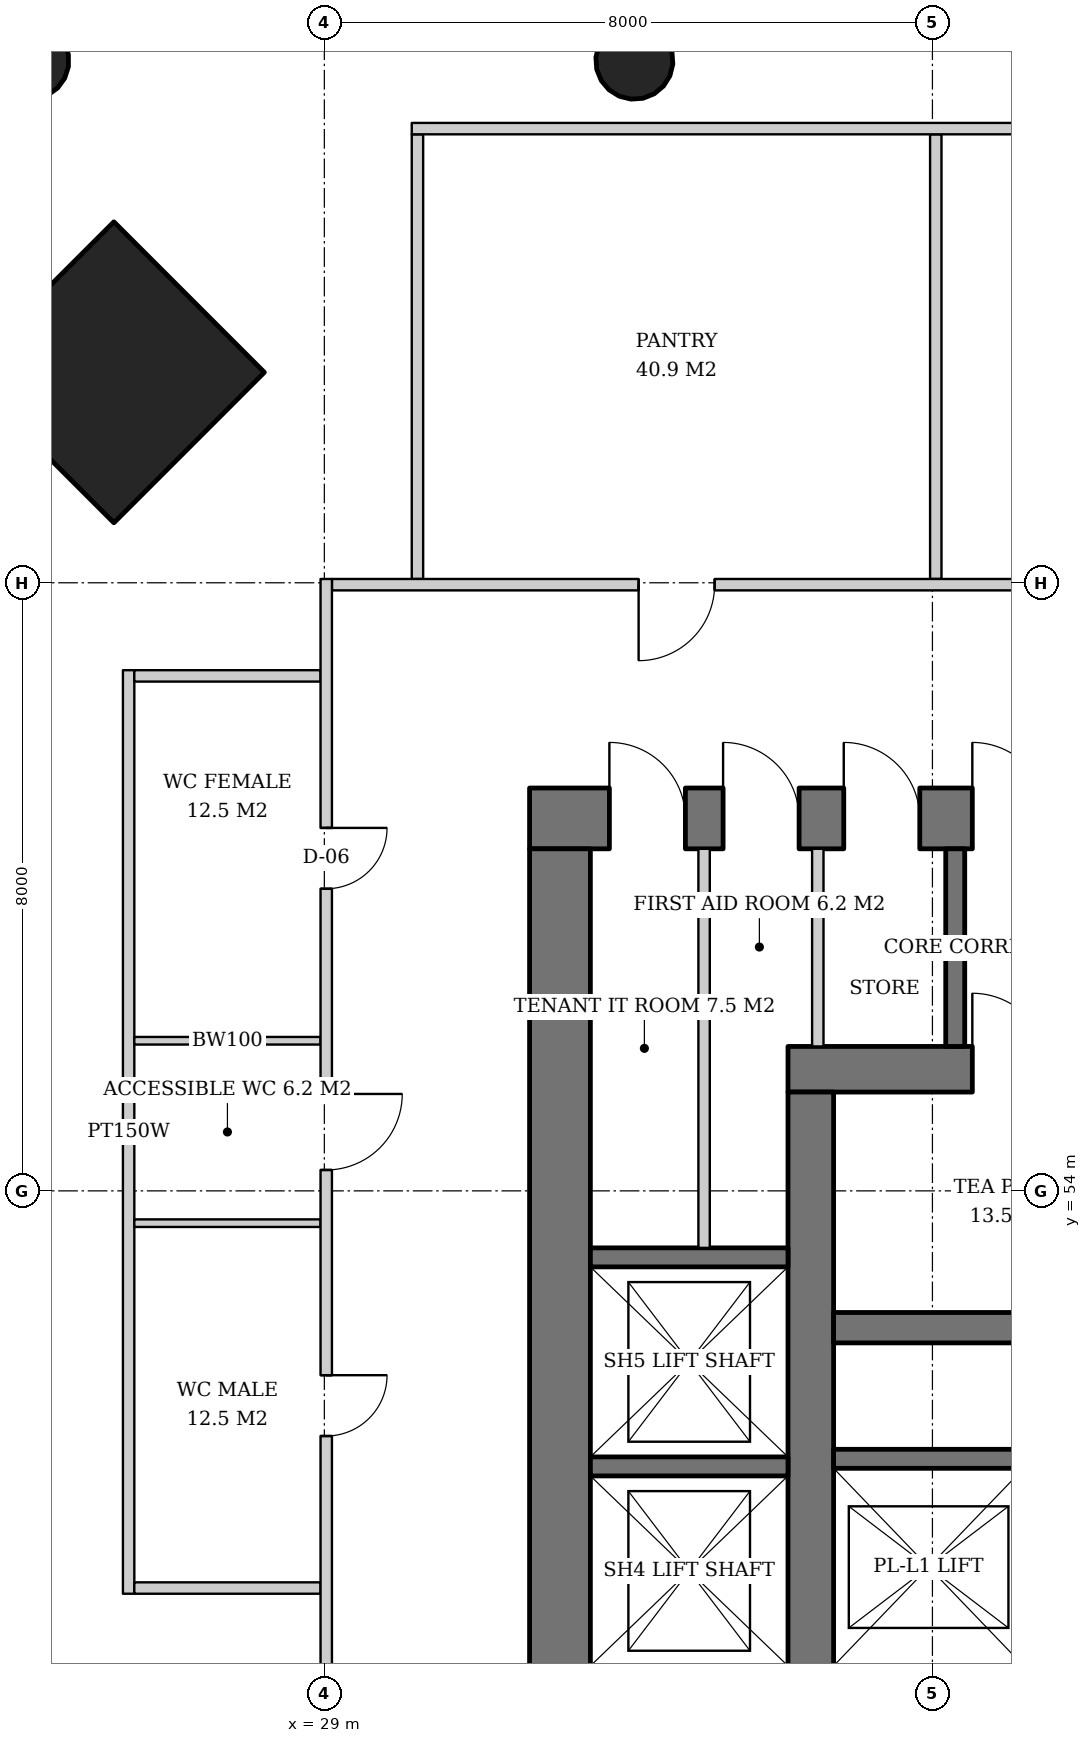
"""IFC4 building model, lengths in metres.
Left out: names, types, materials, properties, quantities, classifications, styles, units other than length and angle.
Written with IfcOpenShell. Run it as: python <this file> out.ifc"""

import sys

from ifc_helpers import new_model, si_unit, direction, frame, frame_2d, origin, origin_2d, place, context, subcontext, project, spatial, rectangle, hollow_circle, extrude, element, fill, save


model = new_model("IFC4")
c1 = context("Model", 3, precision=1e-05, world=origin(), true_north=direction((0.0, 1.0)))
c2 = subcontext(c1, "Body", "Model", "MODEL_VIEW")
j1 = project(units=[si_unit("LENGTHUNIT", "METRE"), si_unit("PLANEANGLEUNIT", "RADIAN")], contexts=[c1])
p1 = place(None, origin())
s1 = spatial("IfcSite", under=j1, at=p1, CompositionType="ELEMENT")
p2 = place(p1, origin())
s2 = spatial("IfcBuilding", under=s1, at=p2, CompositionType="ELEMENT")
p3 = place(p2, frame((0.0, 0.0, 55.2)))
s3 = spatial("IfcBuildingStorey", under=s2, at=p3, CompositionType="ELEMENT", Elevation=55.2)
p4 = place(p3, frame((26.193, 64.807, 0.0), z_axis=(0.031898107953, -0.031898107953, 0.998981992539), x_axis=(0.707106781187, 0.707106781187, 0.0)))
e1 = element("IfcColumn", 1, at=p4, inside=s3, PredefinedType="COLUMN", context=c2, shape_type="SweptSolid", body=[
    extrude(rectangle(XDim=2.8, YDim=2.8, at=origin_2d()), origin(), (0.0, 0.0, 1.0), 3.804),
])
p5 = place(p3, frame((25.093, 68.907, 0.0), z_axis=(0.031962158256, -0.031962158256, 0.998977898093), x_axis=(0.707106781187, 0.707106781187, 0.0)))
e2 = element("IfcColumn", 2, at=p5, inside=s3, PredefinedType="COLUMN", context=c2, shape_type="SweptSolid", body=[
    extrude(hollow_circle(Radius=0.508, WallThickness=0.04, at=origin_2d()), origin(), (0.0, 0.0, 1.0), 3.804),
])
p6 = place(p3, frame((33.056, 68.907, 0.0), z_axis=(0.019196402868, -0.031972604108, 0.999304383411), x_axis=(0.857340985258, 0.514748904804, 0.0)))
e3 = element("IfcColumn", 3, at=p6, inside=s3, PredefinedType="COLUMN", context=c2, shape_type="SweptSolid", body=[
    extrude(hollow_circle(Radius=0.508, WallThickness=0.04, at=origin_2d()), origin(), (0.0, 0.0, 1.0), 3.803),
])
p7 = place(p3, frame((35.1, 55.6, 0.0), z_axis=(0.0, 0.0, 1.0), x_axis=(1.0, 0.0, 0.0)))
e4 = element("IfcWall", 4, at=p7, inside=s3, PredefinedType="SHEAR", context=c2, shape_type="SweptSolid", body=[
    extrude(rectangle(XDim=19.8, YDim=0.6, at=frame_2d((9.9, 0.0))), origin(), (0.0, 0.0, 1.0), 3.8),
])
p8 = place(p7, frame((14.54, 0.0, 0.0)))
e5 = element("IfcOpeningElement", 5, at=p8, cuts=e4, PredefinedType="OPENING", context=c2, shape_type="SweptSolid", body=[
    extrude(rectangle(XDim=1.0, YDim=2.1, at=frame_2d((0.5, 1.05))), frame((0.0, 0.31, 0.0), z_axis=(0.0, -1.0, 0.0), x_axis=(1.0, 0.0, 0.0)), (0.0, 0.0, 1.0), 0.62),
])
p9 = place(p7, frame((2.425, 0.0, 0.0)))
e6 = element("IfcOpeningElement", 6, at=p9, cuts=e4, PredefinedType="OPENING", context=c2, shape_type="SweptSolid", body=[
    extrude(rectangle(XDim=1.0, YDim=2.1, at=frame_2d((0.5, 1.05))), frame((0.0, 0.31, 0.0), z_axis=(0.0, -1.0, 0.0), x_axis=(1.0, 0.0, 0.0)), (0.0, 0.0, 1.0), 0.62),
])
p10 = place(p3, frame((35.4, 36.7, 0.0), z_axis=(0.0, 0.0, 1.0), x_axis=(0.0, 1.0, 0.0)))
e7 = element("IfcWall", 7, at=p10, inside=s3, PredefinedType="SHEAR", context=c2, shape_type="SweptSolid", body=[
    extrude(rectangle(XDim=18.6, YDim=0.6, at=frame_2d((9.3, 0.0))), origin(), (0.0, 0.0, 1.0), 3.8),
])
p11 = place(p10, frame((8.4, 0.0, 0.0)))
e8 = element("IfcOpeningElement", 8, at=p11, cuts=e7, PredefinedType="OPENING", context=c2, shape_type="SweptSolid", body=[
    extrude(rectangle(XDim=1.8, YDim=2.4, at=frame_2d((0.9, 1.2))), frame((0.0, 0.31, 0.0), z_axis=(0.0, -1.0, 0.0), x_axis=(1.0, 0.0, 0.0)), (0.0, 0.0, 1.0), 0.62),
])
p12 = place(p3, frame((31.7, 58.9, 0.0), z_axis=(0.0, 0.0, 1.0), x_axis=(1.0, 0.0, 0.0)))
e9 = element("IfcWall", 9, at=p12, inside=s3, PredefinedType="SHEAR", context=c2, shape_type="SweptSolid", body=[
    extrude(rectangle(XDim=26.6, YDim=0.8, at=frame_2d((13.3, 0.0))), origin(), (0.0, 0.0, 1.0), 3.8),
])
p13 = place(p12, frame((17.94, 0.0, 0.0)))
e10 = element("IfcOpeningElement", 10, at=p13, cuts=e9, PredefinedType="OPENING", context=c2, shape_type="SweptSolid", body=[
    extrude(rectangle(XDim=1.0, YDim=2.1, at=frame_2d((0.5, 1.05))), frame((0.0, 0.41, 0.0), z_axis=(0.0, -1.0, 0.0), x_axis=(1.0, 0.0, 0.0)), (0.0, 0.0, 1.0), 0.82),
])
p14 = place(p12, frame((5.825, 0.0, 0.0)))
e11 = element("IfcOpeningElement", 11, at=p14, cuts=e9, PredefinedType="OPENING", context=c2, shape_type="SweptSolid", body=[
    extrude(rectangle(XDim=1.0, YDim=2.1, at=frame_2d((0.5, 1.05))), frame((0.0, 0.41, 0.0), z_axis=(0.0, -1.0, 0.0), x_axis=(1.0, 0.0, 0.0)), (0.0, 0.0, 1.0), 0.82),
])
p15 = place(p12, frame((1.05, 0.0, 0.0)))
e12 = element("IfcOpeningElement", 12, at=p15, cuts=e9, PredefinedType="OPENING", context=c2, shape_type="SweptSolid", body=[
    extrude(rectangle(XDim=1.0, YDim=2.1, at=frame_2d((0.5, 1.05))), frame((0.0, 0.41, 0.0), z_axis=(0.0, -1.0, 0.0), x_axis=(1.0, 0.0, 0.0)), (0.0, 0.0, 1.0), 0.82),
])
p16 = place(p12, frame((2.546, 0.0, 0.0)))
e13 = element("IfcOpeningElement", 13, at=p16, cuts=e9, PredefinedType="OPENING", context=c2, shape_type="SweptSolid", body=[
    extrude(rectangle(XDim=1.0, YDim=2.1, at=frame_2d((0.5, 1.05))), frame((0.0, 0.41, 0.0), z_axis=(0.0, -1.0, 0.0), x_axis=(1.0, 0.0, 0.0)), (0.0, 0.0, 1.0), 0.82),
])
p17 = place(p12, frame((4.134, 0.0, 0.0)))
e14 = element("IfcOpeningElement", 14, at=p17, cuts=e9, PredefinedType="OPENING", context=c2, shape_type="SweptSolid", body=[
    extrude(rectangle(XDim=1.0, YDim=2.1, at=frame_2d((0.5, 1.05))), frame((0.0, 0.41, 0.0), z_axis=(0.0, -1.0, 0.0), x_axis=(1.0, 0.0, 0.0)), (0.0, 0.0, 1.0), 0.82),
])
p18 = place(p12, frame((9.126, 0.0, 0.0)))
e15 = element("IfcOpeningElement", 15, at=p18, cuts=e9, PredefinedType="OPENING", context=c2, shape_type="SweptSolid", body=[
    extrude(rectangle(XDim=1.0, YDim=2.1, at=frame_2d((0.5, 1.05))), frame((0.0, 0.41, 0.0), z_axis=(0.0, -1.0, 0.0), x_axis=(1.0, 0.0, 0.0)), (0.0, 0.0, 1.0), 0.82),
])
p19 = place(p12, frame((14.029, 0.0, 0.0)))
e16 = element("IfcOpeningElement", 16, at=p19, cuts=e9, PredefinedType="OPENING", context=c2, shape_type="SweptSolid", body=[
    extrude(rectangle(XDim=1.0, YDim=2.1, at=frame_2d((0.5, 1.05))), frame((0.0, 0.41, 0.0), z_axis=(0.0, -1.0, 0.0), x_axis=(1.0, 0.0, 0.0)), (0.0, 0.0, 1.0), 0.82),
])
p20 = place(p12, frame((22.35, 0.0, 0.0)))
e17 = element("IfcOpeningElement", 17, at=p20, cuts=e9, PredefinedType="OPENING", context=c2, shape_type="SweptSolid", body=[
    extrude(rectangle(XDim=1.0, YDim=2.1, at=frame_2d((0.5, 1.05))), frame((0.0, 0.41, 0.0), z_axis=(0.0, -1.0, 0.0), x_axis=(1.0, 0.0, 0.0)), (0.0, 0.0, 1.0), 0.82),
])
p21 = place(p3, frame((32.1, 33.5, 0.0), z_axis=(0.0, 0.0, 1.0), x_axis=(0.0, 1.0, 0.0)))
e18 = element("IfcWall", 18, at=p21, inside=s3, PredefinedType="SHEAR", context=c2, shape_type="SweptSolid", body=[
    extrude(rectangle(XDim=25.0, YDim=0.8, at=frame_2d((12.5, 0.0))), origin(), (0.0, 0.0, 1.0), 3.8),
])
p22 = place(p21, frame((11.6, 0.0, 0.0)))
e19 = element("IfcOpeningElement", 19, at=p22, cuts=e18, PredefinedType="OPENING", context=c2, shape_type="SweptSolid", body=[
    extrude(rectangle(XDim=1.8, YDim=2.4, at=frame_2d((0.9, 1.2))), frame((0.0, 0.41, 0.0), z_axis=(0.0, -1.0, 0.0), x_axis=(1.0, 0.0, 0.0)), (0.0, 0.0, 1.0), 0.82),
])
p23 = place(p3, frame((35.7, 52.2, 0.0), z_axis=(0.0, 0.0, 1.0), x_axis=(1.0, 0.0, 0.0)))
e20 = element("IfcWall", 20, at=p23, inside=s3, PredefinedType="SHEAR", context=c2, shape_type="SweptSolid", body=[
    extrude(rectangle(XDim=18.6, YDim=0.4, at=frame_2d((9.3, 0.0))), origin(), (0.0, 0.0, 1.0), 3.8),
])
p24 = place(p3, frame((35.7, 50.475, 0.0), z_axis=(0.0, 0.0, 1.0), x_axis=(1.0, 0.0, 0.0)))
e21 = element("IfcWall", 21, at=p24, inside=s3, PredefinedType="SHEAR", context=c2, shape_type="SweptSolid", body=[
    extrude(rectangle(XDim=11.0, YDim=0.25, at=frame_2d((5.5, 0.0))), origin(), (0.0, 0.0, 1.0), 3.8),
])
for number, where, z_axis, x_axis in (
    (22, (32.5, 50.375, 0.0), (0.0, 0.0, 1.0), (1.0, 0.0, 0.0)),
    (23, (32.5, 53.125, 0.0), (0.0, 0.0, 1.0), (1.0, 0.0, 0.0)),
):
    element("IfcWall", number, at=place(p3, frame(where, z_axis=z_axis, x_axis=x_axis)), inside=s3, PredefinedType="SHEAR", context=c2, shape_type="SweptSolid", body=[
        extrude(rectangle(XDim=2.6, YDim=0.25, at=frame_2d((1.3, 0.0))), origin(), (0.0, 0.0, 1.0), 3.8),
    ])
p25 = place(p3, frame((37.3, 55.9, 0.0), z_axis=(0.0, 0.0, 1.0), x_axis=(0.0, 1.0, 0.0)))
e24 = element("IfcWall", 24, at=p25, inside=s3, PredefinedType="SOLIDWALL", context=c2, shape_type="SweptSolid", body=[
    extrude(rectangle(XDim=2.6, YDim=0.25, at=frame_2d((1.3, 0.0))), origin(), (0.0, 0.0, 1.0), 3.62),
])
p26 = place(p3, frame((33.996, 53.25, 0.0), z_axis=(0.0, 0.0, 1.0), x_axis=(0.0, 1.0, 0.0)))
e25 = element("IfcWall", 25, at=p26, inside=s3, PredefinedType="SOLIDWALL", context=c2, shape_type="SweptSolid", body=[
    extrude(rectangle(XDim=5.25, YDim=0.15, at=frame_2d((2.625, 0.0))), origin(), (0.0, 0.0, 1.0), 3.62),
])
p27 = place(p3, frame((35.492, 55.9, 0.0), z_axis=(0.0, 0.0, 1.0), x_axis=(0.0, 1.0, 0.0)))
e26 = element("IfcWall", 26, at=p27, inside=s3, PredefinedType="SOLIDWALL", context=c2, shape_type="SweptSolid", body=[
    extrude(rectangle(XDim=2.6, YDim=0.15, at=frame_2d((1.3, 0.0))), origin(), (0.0, 0.0, 1.0), 3.62),
])
for number, where, z_axis, x_axis in (
    (27, (37.044, 62.05, 0.0), (0.0, 0.0, 1.0), (0.0, 1.0, 0.0)),
    (28, (30.225, 62.05, 0.0), (0.0, 0.0, 1.0), (0.0, 1.0, 0.0)),
):
    element("IfcWall", number, at=place(p3, frame(where, z_axis=z_axis, x_axis=x_axis)), inside=s3, PredefinedType="PARTITIONING", context=c2, shape_type="SweptSolid", body=[
        extrude(rectangle(XDim=5.85, YDim=0.15, at=frame_2d((2.925, 0.0))), origin(), (0.0, 0.0, 1.0), 3.62),
    ])
p28 = place(p3, frame((59.85, 67.975, 0.0), z_axis=(0.0, 0.0, 1.0), x_axis=(-1.0, 0.0, 0.0)))
e29 = element("IfcWall", 29, at=p28, inside=s3, PredefinedType="PARTITIONING", context=c2, shape_type="SweptSolid", body=[
    extrude(rectangle(XDim=29.7, YDim=0.15, at=frame_2d((14.85, 0.0))), origin(), (0.0, 0.0, 1.0), 2.612),
])
p29 = place(p3, frame((26.425, 60.85, 0.0), z_axis=(0.0, 0.0, 1.0), x_axis=(0.0, -1.0, 0.0)))
e30 = element("IfcWall", 30, at=p29, inside=s3, PredefinedType="PARTITIONING", context=c2, shape_type="SweptSolid", body=[
    extrude(rectangle(XDim=12.15, YDim=0.15, at=frame_2d((6.075, 0.0))), origin(), (0.0, 0.0, 1.0), 2.612),
])
p30 = place(p3, frame((28.95, 60.775, 0.0), z_axis=(0.0, 0.0, 1.0), x_axis=(-1.0, 0.0, 0.0)))
e31 = element("IfcWall", 31, at=p30, inside=s3, PredefinedType="PARTITIONING", context=c2, shape_type="SweptSolid", body=[
    extrude(rectangle(XDim=2.45, YDim=0.15, at=frame_2d((1.225, 0.0))), origin(), (0.0, 0.0, 1.0), 3.62),
])
for number, where, z_axis, x_axis in (
    (32, (28.95, 55.975, 0.0), (0.0, 0.0, 1.0), (-1.0, 0.0, 0.0)),
    (33, (28.95, 53.575, 0.0), (0.0, 0.0, 1.0), (-1.0, 0.0, 0.0)),
):
    element("IfcWall", number, at=place(p3, frame(where, z_axis=z_axis, x_axis=x_axis)), inside=s3, PredefinedType="SOLIDWALL", context=c2, shape_type="SweptSolid", body=[
        extrude(rectangle(XDim=2.45, YDim=0.1, at=frame_2d((1.225, 0.0))), origin(), (0.0, 0.0, 1.0), 3.62),
    ])
p31 = place(p3, frame((28.95, 48.775, 0.0), z_axis=(0.0, 0.0, 1.0), x_axis=(-1.0, 0.0, 0.0)))
e34 = element("IfcWall", 34, at=p31, inside=s3, PredefinedType="PARTITIONING", context=c2, shape_type="SweptSolid", body=[
    extrude(rectangle(XDim=2.45, YDim=0.15, at=frame_2d((1.225, 0.0))), origin(), (0.0, 0.0, 1.0), 3.62),
])
p32 = place(p3, frame((61.05, 61.975, 0.0), z_axis=(0.0, 0.0, 1.0), x_axis=(-1.0, 0.0, 0.0)))
e35 = element("IfcWall", 35, at=p32, inside=s3, PredefinedType="PARTITIONING", context=c2, shape_type="SweptSolid", body=[
    extrude(rectangle(XDim=31.95, YDim=0.15, at=frame_2d((15.975, 0.0))), origin(), (0.0, 0.0, 1.0), 2.612),
])
p33 = place(p32, frame((4.563, 0.0, 0.0)))
e36 = element("IfcOpeningElement", 36, at=p33, cuts=e35, PredefinedType="OPENING", context=c2, shape_type="SweptSolid", body=[
    extrude(rectangle(XDim=1.0, YDim=2.1, at=frame_2d((0.5, 1.05))), frame((0.0, 0.085, 0.0), z_axis=(0.0, -1.0, 0.0), x_axis=(1.0, 0.0, 0.0)), (0.0, 0.0, 1.0), 0.17),
])
p34 = place(p32, frame((12.14, 0.0, 0.0)))
e37 = element("IfcOpeningElement", 37, at=p34, cuts=e35, PredefinedType="OPENING", context=c2, shape_type="SweptSolid", body=[
    extrude(rectangle(XDim=1.0, YDim=2.1, at=frame_2d((0.5, 1.05))), frame((0.0, 0.085, 0.0), z_axis=(0.0, -1.0, 0.0), x_axis=(1.0, 0.0, 0.0)), (0.0, 0.0, 1.0), 0.17),
])
p35 = place(p32, frame((19.717, 0.0, 0.0)))
e38 = element("IfcOpeningElement", 38, at=p35, cuts=e35, PredefinedType="OPENING", context=c2, shape_type="SweptSolid", body=[
    extrude(rectangle(XDim=1.0, YDim=2.1, at=frame_2d((0.5, 1.05))), frame((0.0, 0.085, 0.0), z_axis=(0.0, -1.0, 0.0), x_axis=(1.0, 0.0, 0.0)), (0.0, 0.0, 1.0), 0.17),
])
p36 = place(p32, frame((26.915, 0.0, 0.0)))
e39 = element("IfcOpeningElement", 39, at=p36, cuts=e35, PredefinedType="OPENING", context=c2, shape_type="SweptSolid", body=[
    extrude(rectangle(XDim=1.0, YDim=2.1, at=frame_2d((0.5, 1.05))), frame((0.0, 0.085, 0.0), z_axis=(0.0, -1.0, 0.0), x_axis=(1.0, 0.0, 0.0)), (0.0, 0.0, 1.0), 0.17),
])
p37 = place(p3, frame((29.025, 62.05, 0.0), z_axis=(0.0, 0.0, 1.0), x_axis=(0.0, -1.0, 0.0)))
e40 = element("IfcWall", 40, at=p37, inside=s3, PredefinedType="PARTITIONING", context=c2, shape_type="SweptSolid", body=[
    extrude(rectangle(XDim=31.95, YDim=0.15, at=frame_2d((15.975, 0.0))), origin(), (0.0, 0.0, 1.0), 2.612),
])
p38 = place(p37, frame((3.275, 0.0, 0.0)))
e41 = element("IfcOpeningElement", 41, at=p38, cuts=e40, PredefinedType="OPENING", context=c2, shape_type="SweptSolid", body=[
    extrude(rectangle(XDim=0.8, YDim=2.1, at=frame_2d((0.4, 1.05))), frame((0.0, 0.085, 0.0), z_axis=(0.0, -1.0, 0.0), x_axis=(1.0, 0.0, 0.0)), (0.0, 0.0, 1.0), 0.17),
])
p39 = place(p37, frame((6.775, 0.0, 0.0)))
e42 = element("IfcOpeningElement", 42, at=p39, cuts=e40, PredefinedType="OPENING", context=c2, shape_type="SweptSolid", body=[
    extrude(rectangle(XDim=1.0, YDim=2.1, at=frame_2d((0.5, 1.05))), frame((0.0, 0.085, 0.0), z_axis=(0.0, -1.0, 0.0), x_axis=(1.0, 0.0, 0.0)), (0.0, 0.0, 1.0), 0.17),
])
p40 = place(p37, frame((10.475, 0.0, 0.0)))
e43 = element("IfcOpeningElement", 43, at=p40, cuts=e40, PredefinedType="OPENING", context=c2, shape_type="SweptSolid", body=[
    extrude(rectangle(XDim=0.8, YDim=2.1, at=frame_2d((0.4, 1.05))), frame((0.0, 0.085, 0.0), z_axis=(0.0, -1.0, 0.0), x_axis=(1.0, 0.0, 0.0)), (0.0, 0.0, 1.0), 0.17),
])
p41 = place(p14, origin())
e44 = element("IfcDoor", 44, at=p41, inside=s3, OperationType="SINGLE_SWING_LEFT", PredefinedType="DOOR", context=c2, shape_type="SweptSolid", body=[
    extrude(rectangle(XDim=1.0, YDim=2.1, at=frame_2d((0.5, 1.05))), frame((0.0, 0.025, 0.0), z_axis=(0.0, -1.0, 0.0), x_axis=(1.0, 0.0, 0.0)), (0.0, 0.0, 1.0), 0.05),
])
fill(e11, e44)
p42 = place(p9, origin())
e45 = element("IfcDoor", 45, at=p42, inside=s3, OperationType="SINGLE_SWING_LEFT", PredefinedType="DOOR", context=c2, shape_type="SweptSolid", body=[
    extrude(rectangle(XDim=1.0, YDim=2.1, at=frame_2d((0.5, 1.05))), frame((0.0, -0.24, 0.0), z_axis=(0.0, -1.0, 0.0), x_axis=(1.0, 0.0, 0.0)), (0.0, 0.0, 1.0), 0.05),
])
fill(e6, e45)
p43 = place(p15, origin())
e46 = element("IfcDoor", 46, at=p43, inside=s3, OperationType="SINGLE_SWING_LEFT", PredefinedType="DOOR", context=c2, shape_type="SweptSolid", body=[
    extrude(rectangle(XDim=1.0, YDim=2.1, at=frame_2d((0.5, 1.05))), frame((0.0, -0.34, 0.0), z_axis=(0.0, -1.0, 0.0), x_axis=(1.0, 0.0, 0.0)), (0.0, 0.0, 1.0), 0.05),
])
fill(e12, e46)
p44 = place(p16, origin())
e47 = element("IfcDoor", 47, at=p44, inside=s3, OperationType="SINGLE_SWING_LEFT", PredefinedType="DOOR", context=c2, shape_type="SweptSolid", body=[
    extrude(rectangle(XDim=1.0, YDim=2.1, at=frame_2d((0.5, 1.05))), frame((0.0, -0.34, 0.0), z_axis=(0.0, -1.0, 0.0), x_axis=(1.0, 0.0, 0.0)), (0.0, 0.0, 1.0), 0.05),
])
fill(e13, e47)
p45 = place(p17, origin())
e48 = element("IfcDoor", 48, at=p45, inside=s3, OperationType="SINGLE_SWING_LEFT", PredefinedType="DOOR", context=c2, shape_type="SweptSolid", body=[
    extrude(rectangle(XDim=1.0, YDim=2.1, at=frame_2d((0.5, 1.05))), frame((0.0, -0.34, 0.0), z_axis=(0.0, -1.0, 0.0), x_axis=(1.0, 0.0, 0.0)), (0.0, 0.0, 1.0), 0.05),
])
fill(e14, e48)
p46 = place(p36, origin())
e49 = element("IfcDoor", 49, at=p46, inside=s3, OperationType="SINGLE_SWING_RIGHT", PredefinedType="DOOR", context=c2, shape_type="SweptSolid", body=[
    extrude(rectangle(XDim=1.0, YDim=2.1, at=frame_2d((0.5, 1.05))), frame((0.0, 0.025, 0.0), z_axis=(0.0, -1.0, 0.0), x_axis=(1.0, 0.0, 0.0)), (0.0, 0.0, 1.0), 0.05),
])
fill(e39, e49)
p47 = place(p38, origin())
e50 = element("IfcDoor", 50, at=p47, inside=s3, OperationType="SINGLE_SWING_LEFT", PredefinedType="DOOR", context=c2, shape_type="SweptSolid", body=[
    extrude(rectangle(XDim=0.8, YDim=2.1, at=frame_2d((0.4, 1.05))), frame((0.0, 0.025, 0.0), z_axis=(0.0, -1.0, 0.0), x_axis=(1.0, 0.0, 0.0)), (0.0, 0.0, 1.0), 0.05),
])
fill(e41, e50)
p48 = place(p39, origin())
e51 = element("IfcDoor", 51, at=p48, inside=s3, OperationType="SINGLE_SWING_LEFT", PredefinedType="DOOR", context=c2, shape_type="SweptSolid", body=[
    extrude(rectangle(XDim=1.0, YDim=2.1, at=frame_2d((0.5, 1.05))), frame((0.0, 0.025, 0.0), z_axis=(0.0, -1.0, 0.0), x_axis=(1.0, 0.0, 0.0)), (0.0, 0.0, 1.0), 0.05),
])
fill(e42, e51)
p49 = place(p40, origin())
e52 = element("IfcDoor", 52, at=p49, inside=s3, OperationType="SINGLE_SWING_LEFT", PredefinedType="DOOR", context=c2, shape_type="SweptSolid", body=[
    extrude(rectangle(XDim=0.8, YDim=2.1, at=frame_2d((0.4, 1.05))), frame((0.0, 0.025, 0.0), z_axis=(0.0, -1.0, 0.0), x_axis=(1.0, 0.0, 0.0)), (0.0, 0.0, 1.0), 0.05),
])
fill(e43, e52)
save(model, sys.argv[1])
